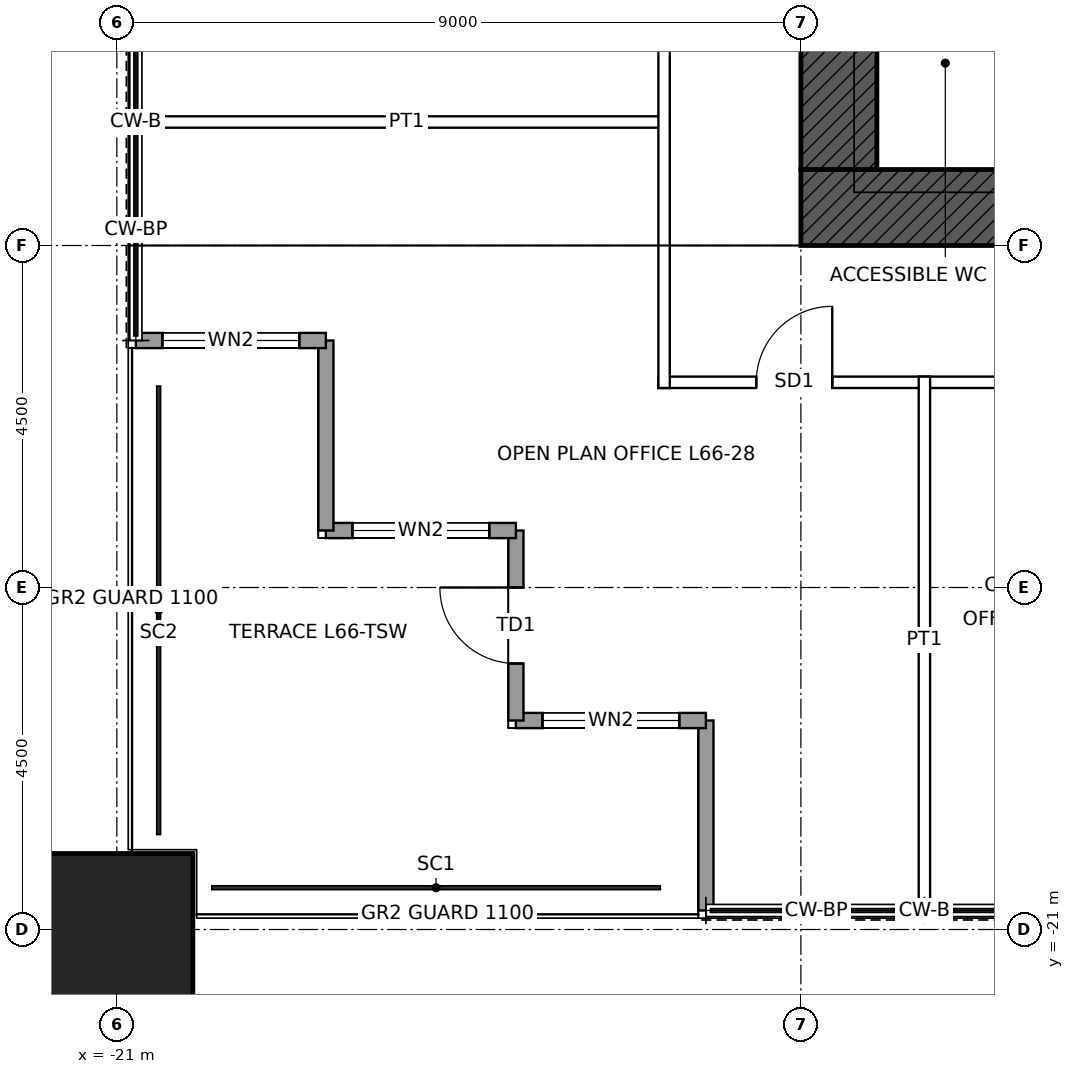
"""IFC4 building model, lengths in metres.
Left out: names, types, materials, properties, quantities, classifications, styles, units other than length and angle.
Written with IfcOpenShell. Run it as: python <this file> out.ifc"""

import sys

from ifc_helpers import new_model, si_unit, direction, frame, frame_2d, origin, origin_2d, place, context, subcontext, project, spatial, rectangle, hollow_rectangle, extrude, element, fill, save


model = new_model("IFC4")
c1 = context("Model", 3, precision=1e-05, world=origin(), true_north=direction((0.0, 1.0)))
c2 = subcontext(c1, "Body", "Model", "MODEL_VIEW")
j1 = project(units=[si_unit("LENGTHUNIT", "METRE"), si_unit("PLANEANGLEUNIT", "RADIAN")], contexts=[c1])
p1 = place(None, origin())
s1 = spatial("IfcSite", under=j1, at=p1, CompositionType="ELEMENT")
p2 = place(p1, origin())
s2 = spatial("IfcBuilding", under=s1, at=p2, CompositionType="ELEMENT")
p3 = place(p2, frame((0.0, 0.0, 299.9)))
s3 = spatial("IfcBuildingStorey", under=s2, at=p3, CompositionType="ELEMENT", Elevation=299.9)
p4 = place(p3, frame((-21.0, -21.0, 0.0), z_axis=(0.0, 0.0, 1.0), x_axis=(1.0, 0.0, 0.0)))
e1 = element("IfcColumn", 1, at=p4, inside=s3, PredefinedType="COLUMN", context=c2, shape_type="SweptSolid", body=[
    extrude(hollow_rectangle(XDim=2.0, YDim=2.0, WallThickness=0.095, at=origin_2d()), origin(), (0.0, 0.0, 1.0), 4.0),
])
p5 = place(p3, frame((12.0, -11.5, 0.0), z_axis=(0.0, 0.0, 1.0), x_axis=(-1.0, 0.0, 0.0)))
e2 = element("IfcWall", 2, at=p5, inside=s3, PredefinedType="SHEAR", context=c2, shape_type="SweptSolid", body=[
    extrude(rectangle(XDim=24.0, YDim=1.0, at=frame_2d((12.0, 0.0))), origin(), (0.0, 0.0, 1.0), 4.0),
])
p6 = place(p5, frame((11.5, 0.0, 0.0)))
e3 = element("IfcOpeningElement", 3, at=p6, cuts=e2, PredefinedType="OPENING", context=c2, shape_type="SweptSolid", body=[
    extrude(rectangle(XDim=1.0, YDim=2.1, at=frame_2d((0.5, 1.05))), frame((0.0, 0.51, 0.0), z_axis=(0.0, -1.0, 0.0), x_axis=(1.0, 0.0, 0.0)), (0.0, 0.0, 1.0), 1.02),
])
p7 = place(p5, frame((1.0, 0.0, 0.0)))
e4 = element("IfcOpeningElement", 4, at=p7, cuts=e2, PredefinedType="OPENING", context=c2, shape_type="SweptSolid", body=[
    extrude(rectangle(XDim=1.0, YDim=2.4, at=frame_2d((0.5, 1.2))), frame((0.0, 0.51, 0.0), z_axis=(0.0, -1.0, 0.0), x_axis=(1.0, 0.0, 0.0)), (0.0, 0.0, 1.0), 1.02),
])
p8 = place(p3, frame((-11.5, -11.0, 0.0), z_axis=(0.0, 0.0, 1.0), x_axis=(0.0, 1.0, 0.0)))
e5 = element("IfcWall", 5, at=p8, inside=s3, PredefinedType="SHEAR", context=c2, shape_type="SweptSolid", body=[
    extrude(rectangle(XDim=22.0, YDim=1.0, at=frame_2d((11.0, 0.0))), origin(), (0.0, 0.0, 1.0), 4.0),
])
p9 = place(p8, frame((10.5, 0.0, 0.0)))
e6 = element("IfcOpeningElement", 6, at=p9, cuts=e5, PredefinedType="OPENING", context=c2, shape_type="SweptSolid", body=[
    extrude(rectangle(XDim=1.0, YDim=2.4, at=frame_2d((0.5, 1.2))), frame((0.0, 0.51, 0.0), z_axis=(0.0, -1.0, 0.0), x_axis=(1.0, 0.0, 0.0)), (0.0, 0.0, 1.0), 1.02),
])
p10 = place(p3, frame((-13.25, -20.75, 0.0), z_axis=(0.0, 0.0, 1.0), x_axis=(0.0, 1.0, 0.0)))
e7 = element("IfcWall", 7, at=p10, inside=s3, PredefinedType="SOLIDWALL", context=c2, shape_type="SweptSolid", body=[
    extrude(rectangle(XDim=2.5, YDim=0.2, at=frame_2d((1.25, 0.0))), origin(), (0.0, 0.0, 1.0), 3.85),
])
p11 = place(p3, frame((-13.25, -18.25, 0.0), z_axis=(0.0, 0.0, 1.0), x_axis=(-1.0, 0.0, 0.0)))
e8 = element("IfcWall", 8, at=p11, inside=s3, PredefinedType="SOLIDWALL", context=c2, shape_type="SweptSolid", body=[
    extrude(rectangle(XDim=2.5, YDim=0.2, at=frame_2d((1.25, 0.0))), origin(), (0.0, 0.0, 1.0), 3.85),
])
p12 = place(p11, frame((0.35, 0.0, 0.3)))
e9 = element("IfcOpeningElement", 9, at=p12, cuts=e8, PredefinedType="OPENING", context=c2, shape_type="SweptSolid", body=[
    extrude(rectangle(XDim=1.8, YDim=2.4, at=frame_2d((0.9, 1.2))), frame((0.0, 0.11, 0.0), z_axis=(0.0, -1.0, 0.0), x_axis=(1.0, 0.0, 0.0)), (0.0, 0.0, 1.0), 0.22),
])
p13 = place(p3, frame((-15.75, -18.25, 0.0), z_axis=(0.0, 0.0, 1.0), x_axis=(0.0, 1.0, 0.0)))
e10 = element("IfcWall", 10, at=p13, inside=s3, PredefinedType="SOLIDWALL", context=c2, shape_type="SweptSolid", body=[
    extrude(rectangle(XDim=2.5, YDim=0.2, at=frame_2d((1.25, 0.0))), origin(), (0.0, 0.0, 1.0), 3.317),
])
p14 = place(p13, frame((0.75, 0.0, 0.0)))
e11 = element("IfcOpeningElement", 11, at=p14, cuts=e10, PredefinedType="OPENING", context=c2, shape_type="SweptSolid", body=[
    extrude(rectangle(XDim=1.0, YDim=2.4, at=frame_2d((0.5, 1.2))), frame((0.0, 0.11, 0.0), z_axis=(0.0, -1.0, 0.0), x_axis=(1.0, 0.0, 0.0)), (0.0, 0.0, 1.0), 0.22),
])
p15 = place(p3, frame((-15.75, -15.75, 0.0), z_axis=(0.0, 0.0, 1.0), x_axis=(-1.0, 0.0, 0.0)))
e12 = element("IfcWall", 12, at=p15, inside=s3, PredefinedType="SOLIDWALL", context=c2, shape_type="SweptSolid", body=[
    extrude(rectangle(XDim=2.5, YDim=0.2, at=frame_2d((1.25, 0.0))), origin(), (0.0, 0.0, 1.0), 3.85),
])
p16 = place(p15, frame((0.35, 0.0, 0.3)))
e13 = element("IfcOpeningElement", 13, at=p16, cuts=e12, PredefinedType="OPENING", context=c2, shape_type="SweptSolid", body=[
    extrude(rectangle(XDim=1.8, YDim=2.4, at=frame_2d((0.9, 1.2))), frame((0.0, 0.11, 0.0), z_axis=(0.0, -1.0, 0.0), x_axis=(1.0, 0.0, 0.0)), (0.0, 0.0, 1.0), 0.22),
])
p17 = place(p3, frame((-18.25, -15.75, 0.0), z_axis=(0.0, 0.0, 1.0), x_axis=(0.0, 1.0, 0.0)))
e14 = element("IfcWall", 14, at=p17, inside=s3, PredefinedType="SOLIDWALL", context=c2, shape_type="SweptSolid", body=[
    extrude(rectangle(XDim=2.5, YDim=0.2, at=frame_2d((1.25, 0.0))), origin(), (0.0, 0.0, 1.0), 3.85),
])
p18 = place(p3, frame((-18.25, -13.25, 0.0), z_axis=(0.0, 0.0, 1.0), x_axis=(-1.0, 0.0, 0.0)))
e15 = element("IfcWall", 15, at=p18, inside=s3, PredefinedType="SOLIDWALL", context=c2, shape_type="SweptSolid", body=[
    extrude(rectangle(XDim=2.5, YDim=0.2, at=frame_2d((1.25, 0.0))), origin(), (0.0, 0.0, 1.0), 3.85),
])
p19 = place(p18, frame((0.35, 0.0, 0.3)))
e16 = element("IfcOpeningElement", 16, at=p19, cuts=e15, PredefinedType="OPENING", context=c2, shape_type="SweptSolid", body=[
    extrude(rectangle(XDim=1.8, YDim=2.4, at=frame_2d((0.9, 1.2))), frame((0.0, 0.11, 0.0), z_axis=(0.0, -1.0, 0.0), x_axis=(1.0, 0.0, 0.0)), (0.0, 0.0, 1.0), 0.22),
])
p20 = place(p3, frame((-13.875, -13.8, 0.0), z_axis=(0.0, 0.0, 1.0), x_axis=(1.0, 0.0, 0.0)))
e17 = element("IfcWall", 17, at=p20, inside=s3, PredefinedType="PARTITIONING", context=c2, shape_type="SweptSolid", body=[
    extrude(rectangle(XDim=27.75, YDim=0.15, at=frame_2d((13.875, 0.0))), origin(), (0.0, 0.0, 1.0), 3.85),
])
p21 = place(p20, frame((21.775, 0.0, 0.0)))
e18 = element("IfcOpeningElement", 18, at=p21, cuts=e17, PredefinedType="OPENING", context=c2, shape_type="SweptSolid", body=[
    extrude(rectangle(XDim=1.0, YDim=2.1, at=frame_2d((0.5, 1.05))), frame((0.0, 0.085, 0.0), z_axis=(0.0, -1.0, 0.0), x_axis=(1.0, 0.0, 0.0)), (0.0, 0.0, 1.0), 0.17),
])
p22 = place(p20, frame((19.625, 0.0, 0.0)))
e19 = element("IfcOpeningElement", 19, at=p22, cuts=e17, PredefinedType="OPENING", context=c2, shape_type="SweptSolid", body=[
    extrude(rectangle(XDim=1.0, YDim=2.1, at=frame_2d((0.5, 1.05))), frame((0.0, 0.085, 0.0), z_axis=(0.0, -1.0, 0.0), x_axis=(1.0, 0.0, 0.0)), (0.0, 0.0, 1.0), 0.17),
])
p23 = place(p20, frame((17.125, 0.0, 0.0)))
e20 = element("IfcOpeningElement", 20, at=p23, cuts=e17, PredefinedType="OPENING", context=c2, shape_type="SweptSolid", body=[
    extrude(rectangle(XDim=1.0, YDim=2.1, at=frame_2d((0.5, 1.05))), frame((0.0, 0.085, 0.0), z_axis=(0.0, -1.0, 0.0), x_axis=(1.0, 0.0, 0.0)), (0.0, 0.0, 1.0), 0.17),
])
p24 = place(p20, frame((14.975, 0.0, 0.0)))
e21 = element("IfcOpeningElement", 21, at=p24, cuts=e17, PredefinedType="OPENING", context=c2, shape_type="SweptSolid", body=[
    extrude(rectangle(XDim=1.0, YDim=2.1, at=frame_2d((0.5, 1.05))), frame((0.0, 0.085, 0.0), z_axis=(0.0, -1.0, 0.0), x_axis=(1.0, 0.0, 0.0)), (0.0, 0.0, 1.0), 0.17),
])
p25 = place(p20, frame((11.775, 0.0, 0.0)))
e22 = element("IfcOpeningElement", 22, at=p25, cuts=e17, PredefinedType="OPENING", context=c2, shape_type="SweptSolid", body=[
    extrude(rectangle(XDim=1.0, YDim=2.1, at=frame_2d((0.5, 1.05))), frame((0.0, 0.085, 0.0), z_axis=(0.0, -1.0, 0.0), x_axis=(1.0, 0.0, 0.0)), (0.0, 0.0, 1.0), 0.17),
])
p26 = place(p20, frame((9.625, 0.0, 0.0)))
e23 = element("IfcOpeningElement", 23, at=p26, cuts=e17, PredefinedType="OPENING", context=c2, shape_type="SweptSolid", body=[
    extrude(rectangle(XDim=1.0, YDim=2.1, at=frame_2d((0.5, 1.05))), frame((0.0, 0.085, 0.0), z_axis=(0.0, -1.0, 0.0), x_axis=(1.0, 0.0, 0.0)), (0.0, 0.0, 1.0), 0.17),
])
p27 = place(p20, frame((7.125, 0.0, 0.0)))
e24 = element("IfcOpeningElement", 24, at=p27, cuts=e17, PredefinedType="OPENING", context=c2, shape_type="SweptSolid", body=[
    extrude(rectangle(XDim=1.0, YDim=2.1, at=frame_2d((0.5, 1.05))), frame((0.0, 0.085, 0.0), z_axis=(0.0, -1.0, 0.0), x_axis=(1.0, 0.0, 0.0)), (0.0, 0.0, 1.0), 0.17),
])
p28 = place(p20, frame((4.438, 0.0, 0.0)))
e25 = element("IfcOpeningElement", 25, at=p28, cuts=e17, PredefinedType="OPENING", context=c2, shape_type="SweptSolid", body=[
    extrude(rectangle(XDim=1.0, YDim=2.1, at=frame_2d((0.5, 1.05))), frame((0.0, 0.085, 0.0), z_axis=(0.0, -1.0, 0.0), x_axis=(1.0, 0.0, 0.0)), (0.0, 0.0, 1.0), 0.17),
])
p29 = place(p20, frame((25.625, 0.0, 0.0)))
e26 = element("IfcOpeningElement", 26, at=p29, cuts=e17, PredefinedType="OPENING", context=c2, shape_type="SweptSolid", body=[
    extrude(rectangle(XDim=1.0, YDim=2.4, at=frame_2d((0.5, 1.2))), frame((0.0, 0.085, 0.0), z_axis=(0.0, -1.0, 0.0), x_axis=(1.0, 0.0, 0.0)), (0.0, 0.0, 1.0), 0.17),
])
p30 = place(p20, frame((1.288, 0.0, 0.0)))
e27 = element("IfcOpeningElement", 27, at=p30, cuts=e17, PredefinedType="OPENING", context=c2, shape_type="SweptSolid", body=[
    extrude(rectangle(XDim=1.0, YDim=2.4, at=frame_2d((0.5, 1.2))), frame((0.0, 0.085, 0.0), z_axis=(0.0, -1.0, 0.0), x_axis=(1.0, 0.0, 0.0)), (0.0, 0.0, 1.0), 0.17),
])
p31 = place(p3, frame((-20.65, -10.375, 0.0), z_axis=(0.0, 0.0, 1.0), x_axis=(1.0, 0.0, 0.0)))
e28 = element("IfcWall", 28, at=p31, inside=s3, PredefinedType="PARTITIONING", context=c2, shape_type="SweptSolid", body=[
    extrude(rectangle(XDim=6.925, YDim=0.15, at=frame_2d((3.462, 0.0))), origin(), (0.0, 0.0, 1.0), 3.85),
])
p32 = place(p3, frame((-13.8, -13.875, 0.0), z_axis=(0.0, 0.0, 1.0), x_axis=(0.0, 1.0, 0.0)))
e29 = element("IfcWall", 29, at=p32, inside=s3, PredefinedType="PARTITIONING", context=c2, shape_type="SweptSolid", body=[
    extrude(rectangle(XDim=11.45, YDim=0.15, at=frame_2d((5.725, 0.0))), origin(), (0.0, 0.0, 1.0), 3.85),
])
p33 = place(p32, frame((4.438, 0.0, 0.0)))
e30 = element("IfcOpeningElement", 30, at=p33, cuts=e29, PredefinedType="OPENING", context=c2, shape_type="SweptSolid", body=[
    extrude(rectangle(XDim=1.0, YDim=2.1, at=frame_2d((0.5, 1.05))), frame((0.0, 0.085, 0.0), z_axis=(0.0, -1.0, 0.0), x_axis=(1.0, 0.0, 0.0)), (0.0, 0.0, 1.0), 0.17),
])
p34 = place(p32, frame((7.125, 0.0, 0.0)))
e31 = element("IfcOpeningElement", 31, at=p34, cuts=e29, PredefinedType="OPENING", context=c2, shape_type="SweptSolid", body=[
    extrude(rectangle(XDim=1.0, YDim=2.1, at=frame_2d((0.5, 1.05))), frame((0.0, 0.085, 0.0), z_axis=(0.0, -1.0, 0.0), x_axis=(1.0, 0.0, 0.0)), (0.0, 0.0, 1.0), 0.17),
])
p35 = place(p32, frame((9.625, 0.0, 0.0)))
e32 = element("IfcOpeningElement", 32, at=p35, cuts=e29, PredefinedType="OPENING", context=c2, shape_type="SweptSolid", body=[
    extrude(rectangle(XDim=1.0, YDim=2.1, at=frame_2d((0.5, 1.05))), frame((0.0, 0.085, 0.0), z_axis=(0.0, -1.0, 0.0), x_axis=(1.0, 0.0, 0.0)), (0.0, 0.0, 1.0), 0.17),
])
p36 = place(p3, frame((-10.375, -20.65, 0.0), z_axis=(0.0, 0.0, 1.0), x_axis=(0.0, 1.0, 0.0)))
e33 = element("IfcWall", 33, at=p36, inside=s3, PredefinedType="PARTITIONING", context=c2, shape_type="SweptSolid", body=[
    extrude(rectangle(XDim=6.925, YDim=0.15, at=frame_2d((3.462, 0.0))), origin(), (0.0, 0.0, 1.0), 3.85),
])
p37 = place(p12, origin())
e34 = element("IfcWindow", 34, at=p37, inside=s3, PartitioningType="SINGLE_PANEL", PredefinedType="WINDOW", context=c2, shape_type="SweptSolid", body=[
    extrude(rectangle(XDim=1.8, YDim=2.4, at=frame_2d((0.9, 1.2))), frame((0.0, 0.03, 0.0), z_axis=(0.0, -1.0, 0.0), x_axis=(1.0, 0.0, 0.0)), (0.0, 0.0, 1.0), 0.06),
])
fill(e9, e34)
p38 = place(p14, origin())
e35 = element("IfcDoor", 35, at=p38, inside=s3, OperationType="SINGLE_SWING_RIGHT", PredefinedType="DOOR", context=c2, shape_type="SweptSolid", body=[
    extrude(rectangle(XDim=1.0, YDim=2.4, at=frame_2d((0.5, 1.2))), frame((0.0, 0.025, 0.0), z_axis=(0.0, -1.0, 0.0), x_axis=(1.0, 0.0, 0.0)), (0.0, 0.0, 1.0), 0.05),
])
fill(e11, e35)
p39 = place(p16, origin())
e36 = element("IfcWindow", 36, at=p39, inside=s3, PartitioningType="SINGLE_PANEL", PredefinedType="WINDOW", context=c2, shape_type="SweptSolid", body=[
    extrude(rectangle(XDim=1.8, YDim=2.4, at=frame_2d((0.9, 1.2))), frame((0.0, 0.03, 0.0), z_axis=(0.0, -1.0, 0.0), x_axis=(1.0, 0.0, 0.0)), (0.0, 0.0, 1.0), 0.06),
])
fill(e13, e36)
p40 = place(p19, origin())
e37 = element("IfcWindow", 37, at=p40, inside=s3, PartitioningType="SINGLE_PANEL", PredefinedType="WINDOW", context=c2, shape_type="SweptSolid", body=[
    extrude(rectangle(XDim=1.8, YDim=2.4, at=frame_2d((0.9, 1.2))), frame((0.0, 0.03, 0.0), z_axis=(0.0, -1.0, 0.0), x_axis=(1.0, 0.0, 0.0)), (0.0, 0.0, 1.0), 0.06),
])
fill(e16, e37)
p41 = place(p30, origin())
e38 = element("IfcDoor", 38, at=p41, inside=s3, OperationType="SINGLE_SWING_RIGHT", PredefinedType="DOOR", context=c2, shape_type="SweptSolid", body=[
    extrude(rectangle(XDim=1.0, YDim=2.4, at=frame_2d((0.5, 1.2))), frame((0.0, 0.025, 0.0), z_axis=(0.0, -1.0, 0.0), x_axis=(1.0, 0.0, 0.0)), (0.0, 0.0, 1.0), 0.05),
])
fill(e27, e38)
save(model, sys.argv[1])
